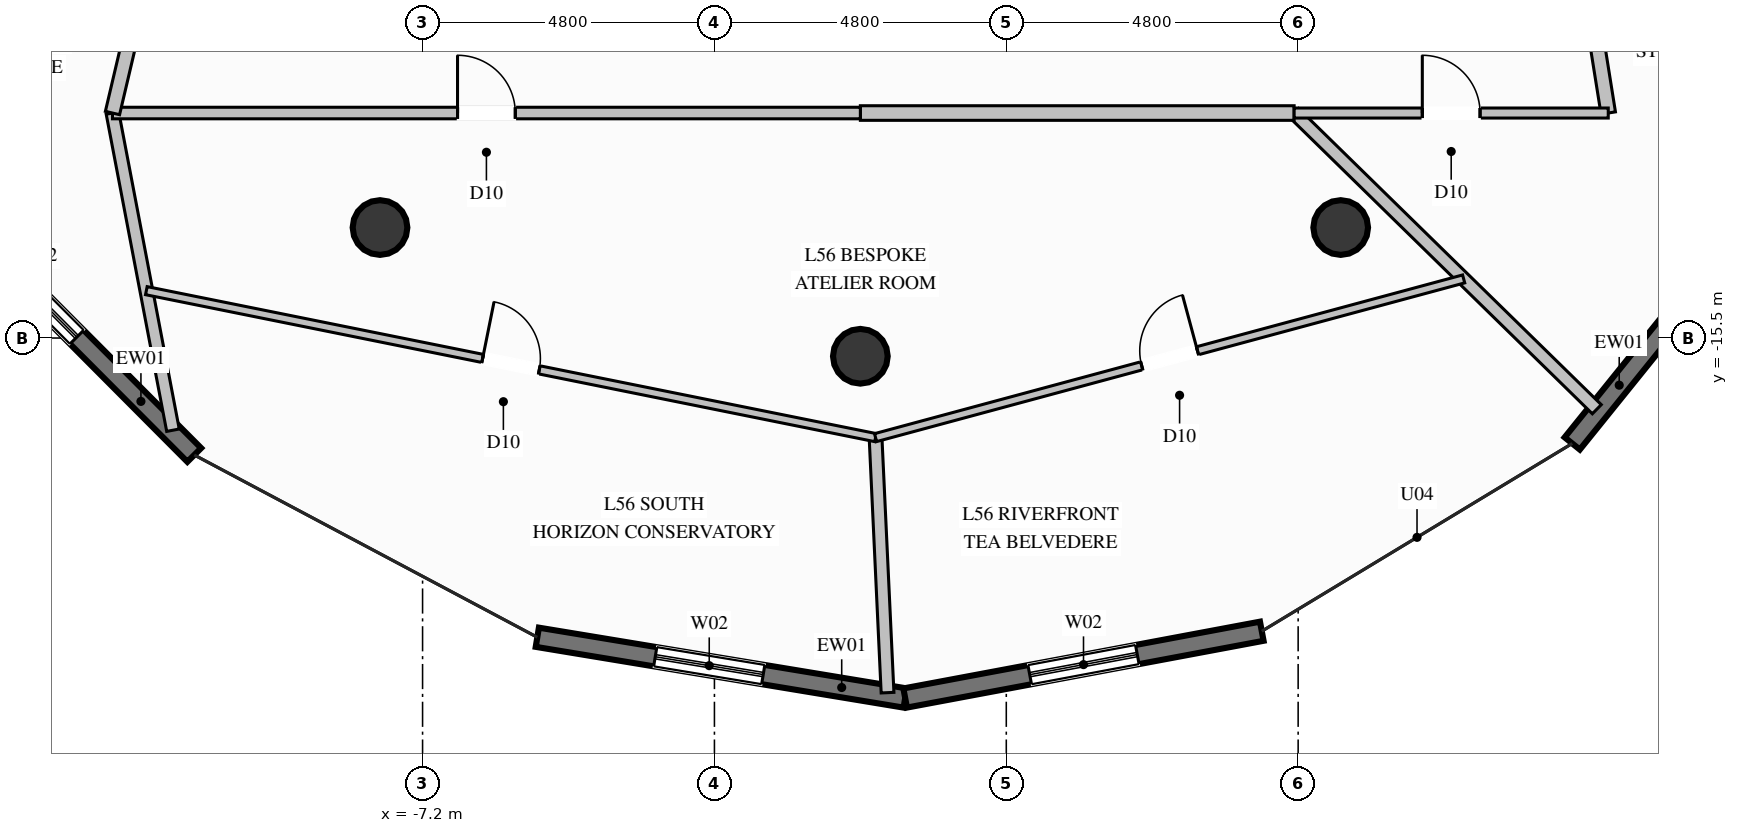
"""IFC4 building model, lengths in metres.
Left out: names, types, materials, properties, quantities, classifications, styles, units other than length and angle.
Written with IfcOpenShell. Run it as: python <this file> out.ifc"""

import sys

from ifc_helpers import new_model, si_unit, direction, frame, frame_2d, origin, origin_2d, place, context, subcontext, project, spatial, rectangle, circle, extrude, element, fill, save


model = new_model("IFC4")
c1 = context("Model", 3, precision=1e-05, world=origin(), true_north=direction((0.0, 1.0)))
c2 = subcontext(c1, "Body", "Model", "MODEL_VIEW")
j1 = project(units=[si_unit("LENGTHUNIT", "METRE"), si_unit("PLANEANGLEUNIT", "RADIAN")], contexts=[c1])
p1 = place(None, origin())
s1 = spatial("IfcSite", under=j1, at=p1, CompositionType="ELEMENT")
p2 = place(p1, origin())
s2 = spatial("IfcBuilding", under=s1, at=p2, CompositionType="ELEMENT")
p3 = place(p2, frame((0.0, 0.0, 216.4)))
s3 = spatial("IfcBuildingStorey", under=s2, at=p3, CompositionType="ELEMENT", Elevation=216.4)
for number, where, z_axis, x_axis in (
    (1, (-7.9, -13.683, 0.0), (0.0, 0.0, 1.0), (1.0, 0.0, 0.0)),
    (2, (0.0, -15.8, 0.0), (0.0, 0.0, 1.0), (1.0, 0.0, 0.0)),
    (3, (7.9, -13.683, 0.0), (0.0, 0.0, 1.0), (1.0, 0.0, 0.0)),
):
    element("IfcColumn", number, at=place(p3, frame(where, z_axis=z_axis, x_axis=x_axis)), inside=s3, PredefinedType="COLUMN", context=c2, shape_type="SweptSolid", body=[
        extrude(circle(Radius=0.45, at=origin_2d()), origin(), (0.0, 0.0, 1.0), 3.6),
    ])
p4 = place(p3, frame((15.556, -12.46, 0.0), z_axis=(0.0, 0.0, 1.0), x_axis=(-0.627550861285, -0.778575568908, 0.0)))
e4 = element("IfcWall", 4, at=p4, inside=s3, PredefinedType="SOLIDWALL", context=c2, shape_type="SweptSolid", body=[
    extrude(rectangle(XDim=6.132, YDim=0.32, at=frame_2d((3.066, 0.0))), origin(), (0.0, 0.0, 1.0), 3.36),
])
p5 = place(p4, frame((1.92, 0.0, 0.85)))
e5 = element("IfcOpeningElement", 5, at=p5, cuts=e4, PredefinedType="OPENING", context=c2, shape_type="SweptSolid", body=[
    extrude(rectangle(XDim=1.5, YDim=1.2, at=frame_2d((0.75, 0.6))), frame((0.0, 0.17, 0.0), z_axis=(0.0, -1.0, 0.0), x_axis=(1.0, 0.0, 0.0)), (0.0, 0.0, 1.0), 0.34),
])
p6 = place(p3, frame((-10.955, -17.423, 0.0), z_axis=(0.0, 0.0, 1.0), x_axis=(-0.705578543979, 0.708631722601, 0.0)))
e6 = element("IfcWall", 6, at=p6, inside=s3, PredefinedType="SOLIDWALL", context=c2, shape_type="SweptSolid", body=[
    extrude(rectangle(XDim=6.637, YDim=0.32, at=frame_2d((3.318, 0.0))), origin(), (0.0, 0.0, 1.0), 3.36),
])
p7 = place(p6, frame((2.736, 0.0, 0.35)))
e7 = element("IfcOpeningElement", 7, at=p7, cuts=e6, PredefinedType="OPENING", context=c2, shape_type="SweptSolid", body=[
    extrude(rectangle(XDim=1.8, YDim=2.6, at=frame_2d((0.9, 1.3))), frame((0.0, 0.17, 0.0), z_axis=(0.0, -1.0, 0.0), x_axis=(1.0, 0.0, 0.0)), (0.0, 0.0, 1.0), 0.34),
])
p8 = place(p3, frame((0.737, -21.42, 0.0), z_axis=(0.0, 0.0, 1.0), x_axis=(-0.986639234259, 0.162920291618, 0.0)))
e8 = element("IfcWall", 8, at=p8, inside=s3, PredefinedType="SOLIDWALL", context=c2, shape_type="SweptSolid", body=[
    extrude(rectangle(XDim=6.132, YDim=0.32, at=frame_2d((3.066, 0.0))), origin(), (0.0, 0.0, 1.0), 3.36),
])
p9 = place(p8, frame((2.366, 0.0, 0.35)))
e9 = element("IfcOpeningElement", 9, at=p9, cuts=e8, PredefinedType="OPENING", context=c2, shape_type="SweptSolid", body=[
    extrude(rectangle(XDim=1.8, YDim=2.6, at=frame_2d((0.9, 1.3))), frame((0.0, 0.17, 0.0), z_axis=(0.0, -1.0, 0.0), x_axis=(1.0, 0.0, 0.0)), (0.0, 0.0, 1.0), 0.34),
])
p10 = place(p3, frame((6.602, -20.322, 0.0), z_axis=(0.0, 0.0, 1.0), x_axis=(-0.982926338905, -0.183999489908, 0.0)))
e10 = element("IfcWall", 10, at=p10, inside=s3, PredefinedType="SOLIDWALL", context=c2, shape_type="SweptSolid", body=[
    extrude(rectangle(XDim=5.967, YDim=0.32, at=frame_2d((2.983, 0.0))), origin(), (0.0, 0.0, 1.0), 3.36),
])
p11 = place(p10, frame((2.083, 0.0, 0.35)))
e11 = element("IfcOpeningElement", 11, at=p11, cuts=e10, PredefinedType="OPENING", context=c2, shape_type="SweptSolid", body=[
    extrude(rectangle(XDim=1.8, YDim=2.6, at=frame_2d((0.9, 1.3))), frame((0.0, 0.17, 0.0), z_axis=(0.0, -1.0, 0.0), x_axis=(1.0, 0.0, 0.0)), (0.0, 0.0, 1.0), 0.34),
])
p12 = place(p3, frame((7.134, -11.8, 0.0), z_axis=(0.0, 0.0, 1.0), x_axis=(0.714759358417, -0.699370473751, 0.0)))
e12 = element("IfcWall", 12, at=p12, inside=s3, PredefinedType="PARTITIONING", context=c2, shape_type="SweptSolid", body=[
    extrude(rectangle(XDim=6.965, YDim=0.21, at=frame_2d((3.482, 0.0))), origin(), (0.0, 0.0, 1.0), 3.36),
])
p13 = place(p3, frame((-12.3, -11.8, 0.0), z_axis=(0.0, 0.0, 1.0), x_axis=(0.187399426653, -0.982283795494, 0.0)))
e13 = element("IfcWall", 13, at=p13, inside=s3, PredefinedType="PARTITIONING", context=c2, shape_type="SweptSolid", body=[
    extrude(rectangle(XDim=5.31, YDim=0.21, at=frame_2d((2.655, 0.0))), origin(), (0.0, 0.0, 1.0), 3.36),
])
p14 = place(p3, frame((0.0, -11.8, 0.0), z_axis=(0.0, 0.0, 1.0), x_axis=(1.0, 0.0, 0.0)))
e14 = element("IfcWall", 14, at=p14, inside=s3, PredefinedType="PARTITIONING", context=c2, shape_type="SweptSolid", body=[
    extrude(rectangle(XDim=7.134, YDim=0.24, at=frame_2d((3.567, 0.0))), origin(), (0.0, 0.0, 1.0), 3.36),
])
p15 = place(p3, frame((-12.3, -11.8, 0.0), z_axis=(0.0, 0.0, 1.0), x_axis=(1.0, 0.0, 0.0)))
e15 = element("IfcWall", 15, at=p15, inside=s3, PredefinedType="PARTITIONING", context=c2, shape_type="SweptSolid", body=[
    extrude(rectangle(XDim=12.3, YDim=0.19, at=frame_2d((6.15, 0.0))), origin(), (0.0, 0.0, 1.0), 3.36),
])
p16 = place(p15, frame((5.675, 0.0, 0.0)))
e16 = element("IfcOpeningElement", 16, at=p16, cuts=e15, PredefinedType="OPENING", context=c2, shape_type="SweptSolid", body=[
    extrude(rectangle(XDim=0.95, YDim=2.1, at=frame_2d((0.475, 1.05))), frame((0.0, 0.105, 0.0), z_axis=(0.0, -1.0, 0.0), x_axis=(1.0, 0.0, 0.0)), (0.0, 0.0, 1.0), 0.21),
])
p17 = place(p3, frame((-11.058, -6.525, 0.0), z_axis=(0.0, 0.0, 1.0), x_axis=(-0.229167390813, -0.973387028364, 0.0)))
e17 = element("IfcWall", 17, at=p17, inside=s3, PredefinedType="PARTITIONING", context=c2, shape_type="SweptSolid", body=[
    extrude(rectangle(XDim=5.419, YDim=0.24, at=frame_2d((2.71, 0.0))), origin(), (0.0, 0.0, 1.0), 3.36),
])
p18 = place(p17, frame((2.21, 0.0, 0.0)))
e18 = element("IfcOpeningElement", 18, at=p18, cuts=e17, PredefinedType="OPENING", context=c2, shape_type="SweptSolid", body=[
    extrude(rectangle(XDim=1.0, YDim=2.2, at=frame_2d((0.5, 1.1))), frame((0.0, 0.13, 0.0), z_axis=(0.0, -1.0, 0.0), x_axis=(1.0, 0.0, 0.0)), (0.0, 0.0, 1.0), 0.26),
])
p19 = place(p3, frame((0.25, -17.138, 0.0), z_axis=(0.0, 0.0, 1.0), x_axis=(0.046924212766, -0.998898452425, 0.0)))
e19 = element("IfcWall", 19, at=p19, inside=s3, PredefinedType="PARTITIONING", context=c2, shape_type="SweptSolid", body=[
    extrude(rectangle(XDim=4.199, YDim=0.21, at=frame_2d((2.099, 0.0))), origin(), (0.0, 0.0, 1.0), 3.36),
])
p20 = place(p3, frame((-11.743, -14.721, 0.0), z_axis=(0.0, 0.0, 1.0), x_axis=(0.980290248813, -0.197562719363, 0.0)))
e20 = element("IfcWall", 20, at=p20, inside=s3, PredefinedType="PARTITIONING", context=c2, shape_type="SweptSolid", body=[
    extrude(rectangle(XDim=12.234, YDim=0.135, at=frame_2d((6.117, 0.0))), origin(), (0.0, 0.0, 1.0), 3.36),
])
p21 = place(p20, frame((5.642, 0.0, 0.0)))
e21 = element("IfcOpeningElement", 21, at=p21, cuts=e20, PredefinedType="OPENING", context=c2, shape_type="SweptSolid", body=[
    extrude(rectangle(XDim=0.95, YDim=2.1, at=frame_2d((0.475, 1.05))), frame((0.0, 0.078, 0.0), z_axis=(0.0, -1.0, 0.0), x_axis=(1.0, 0.0, 0.0)), (0.0, 0.0, 1.0), 0.155),
])
p22 = place(p3, frame((0.25, -17.138, 0.0), z_axis=(0.0, 0.0, 1.0), x_axis=(0.965469486356, 0.260516162484, 0.0)))
e22 = element("IfcWall", 22, at=p22, inside=s3, PredefinedType="PARTITIONING", context=c2, shape_type="SweptSolid", body=[
    extrude(rectangle(XDim=10.018, YDim=0.135, at=frame_2d((5.009, 0.0))), origin(), (0.0, 0.0, 1.0), 3.36),
])
p23 = place(p22, frame((4.534, 0.0, 0.0)))
e23 = element("IfcOpeningElement", 23, at=p23, cuts=e22, PredefinedType="OPENING", context=c2, shape_type="SweptSolid", body=[
    extrude(rectangle(XDim=0.95, YDim=2.1, at=frame_2d((0.475, 1.05))), frame((0.0, 0.078, 0.0), z_axis=(0.0, -1.0, 0.0), x_axis=(1.0, 0.0, 0.0)), (0.0, 0.0, 1.0), 0.155),
])
p24 = place(p3, frame((12.3, -11.8, 0.0), z_axis=(0.0, 0.0, 1.0), x_axis=(-0.157628647668, 0.987498460472, 0.0)))
e24 = element("IfcWall", 24, at=p24, inside=s3, PredefinedType="PARTITIONING", context=c2, shape_type="SweptSolid", body=[
    extrude(rectangle(XDim=5.342, YDim=0.24, at=frame_2d((2.671, 0.0))), origin(), (0.0, 0.0, 1.0), 3.36),
])
p25 = place(p3, frame((7.134, -11.8, 0.0), z_axis=(0.0, 0.0, 1.0), x_axis=(1.0, 0.0, 0.0)))
e25 = element("IfcWall", 25, at=p25, inside=s3, PredefinedType="PARTITIONING", context=c2, shape_type="SweptSolid", body=[
    extrude(rectangle(XDim=5.166, YDim=0.165, at=frame_2d((2.583, 0.0))), origin(), (0.0, 0.0, 1.0), 3.36),
])
p26 = place(p25, frame((2.108, 0.0, 0.0)))
e26 = element("IfcOpeningElement", 26, at=p26, cuts=e25, PredefinedType="OPENING", context=c2, shape_type="SweptSolid", body=[
    extrude(rectangle(XDim=0.95, YDim=2.1, at=frame_2d((0.475, 1.05))), frame((0.0, 0.093, 0.0), z_axis=(0.0, -1.0, 0.0), x_axis=(1.0, 0.0, 0.0)), (0.0, 0.0, 1.0), 0.185),
])
p27 = place(p7, origin())
e27 = element("IfcWindow", 27, at=p27, inside=s3, PartitioningType="SINGLE_PANEL", PredefinedType="WINDOW", context=c2, shape_type="SweptSolid", body=[
    extrude(rectangle(XDim=1.8, YDim=2.6, at=frame_2d((0.9, 1.3))), frame((0.0, 0.03, 0.0), z_axis=(0.0, -1.0, 0.0), x_axis=(1.0, 0.0, 0.0)), (0.0, 0.0, 1.0), 0.06),
])
fill(e7, e27)
p28 = place(p9, origin())
e28 = element("IfcWindow", 28, at=p28, inside=s3, PartitioningType="SINGLE_PANEL", PredefinedType="WINDOW", context=c2, shape_type="SweptSolid", body=[
    extrude(rectangle(XDim=1.8, YDim=2.6, at=frame_2d((0.9, 1.3))), frame((0.0, 0.03, 0.0), z_axis=(0.0, -1.0, 0.0), x_axis=(1.0, 0.0, 0.0)), (0.0, 0.0, 1.0), 0.06),
])
fill(e9, e28)
p29 = place(p11, origin())
e29 = element("IfcWindow", 29, at=p29, inside=s3, PartitioningType="SINGLE_PANEL", PredefinedType="WINDOW", context=c2, shape_type="SweptSolid", body=[
    extrude(rectangle(XDim=1.8, YDim=2.6, at=frame_2d((0.9, 1.3))), frame((0.0, 0.03, 0.0), z_axis=(0.0, -1.0, 0.0), x_axis=(1.0, 0.0, 0.0)), (0.0, 0.0, 1.0), 0.06),
])
fill(e11, e29)
p30 = place(p16, origin())
e30 = element("IfcDoor", 30, at=p30, inside=s3, OperationType="SINGLE_SWING_LEFT", PredefinedType="DOOR", context=c2, shape_type="SweptSolid", body=[
    extrude(rectangle(XDim=0.95, YDim=2.1, at=frame_2d((0.475, 1.05))), frame((0.0, 0.025, 0.0), z_axis=(0.0, -1.0, 0.0), x_axis=(1.0, 0.0, 0.0)), (0.0, 0.0, 1.0), 0.05),
])
fill(e16, e30)
p31 = place(p21, origin())
e31 = element("IfcDoor", 31, at=p31, inside=s3, OperationType="SINGLE_SWING_LEFT", PredefinedType="DOOR", context=c2, shape_type="SweptSolid", body=[
    extrude(rectangle(XDim=0.95, YDim=2.1, at=frame_2d((0.475, 1.05))), frame((0.0, 0.025, 0.0), z_axis=(0.0, -1.0, 0.0), x_axis=(1.0, 0.0, 0.0)), (0.0, 0.0, 1.0), 0.05),
])
fill(e21, e31)
p32 = place(p23, origin())
e32 = element("IfcDoor", 32, at=p32, inside=s3, OperationType="SINGLE_SWING_RIGHT", PredefinedType="DOOR", context=c2, shape_type="SweptSolid", body=[
    extrude(rectangle(XDim=0.95, YDim=2.1, at=frame_2d((0.475, 1.05))), frame((0.0, 0.025, 0.0), z_axis=(0.0, -1.0, 0.0), x_axis=(1.0, 0.0, 0.0)), (0.0, 0.0, 1.0), 0.05),
])
fill(e23, e32)
p33 = place(p26, origin())
e33 = element("IfcDoor", 33, at=p33, inside=s3, OperationType="SINGLE_SWING_LEFT", PredefinedType="DOOR", context=c2, shape_type="SweptSolid", body=[
    extrude(rectangle(XDim=0.95, YDim=2.1, at=frame_2d((0.475, 1.05))), frame((0.0, 0.025, 0.0), z_axis=(0.0, -1.0, 0.0), x_axis=(1.0, 0.0, 0.0)), (0.0, 0.0, 1.0), 0.05),
])
fill(e26, e33)
save(model, sys.argv[1])
